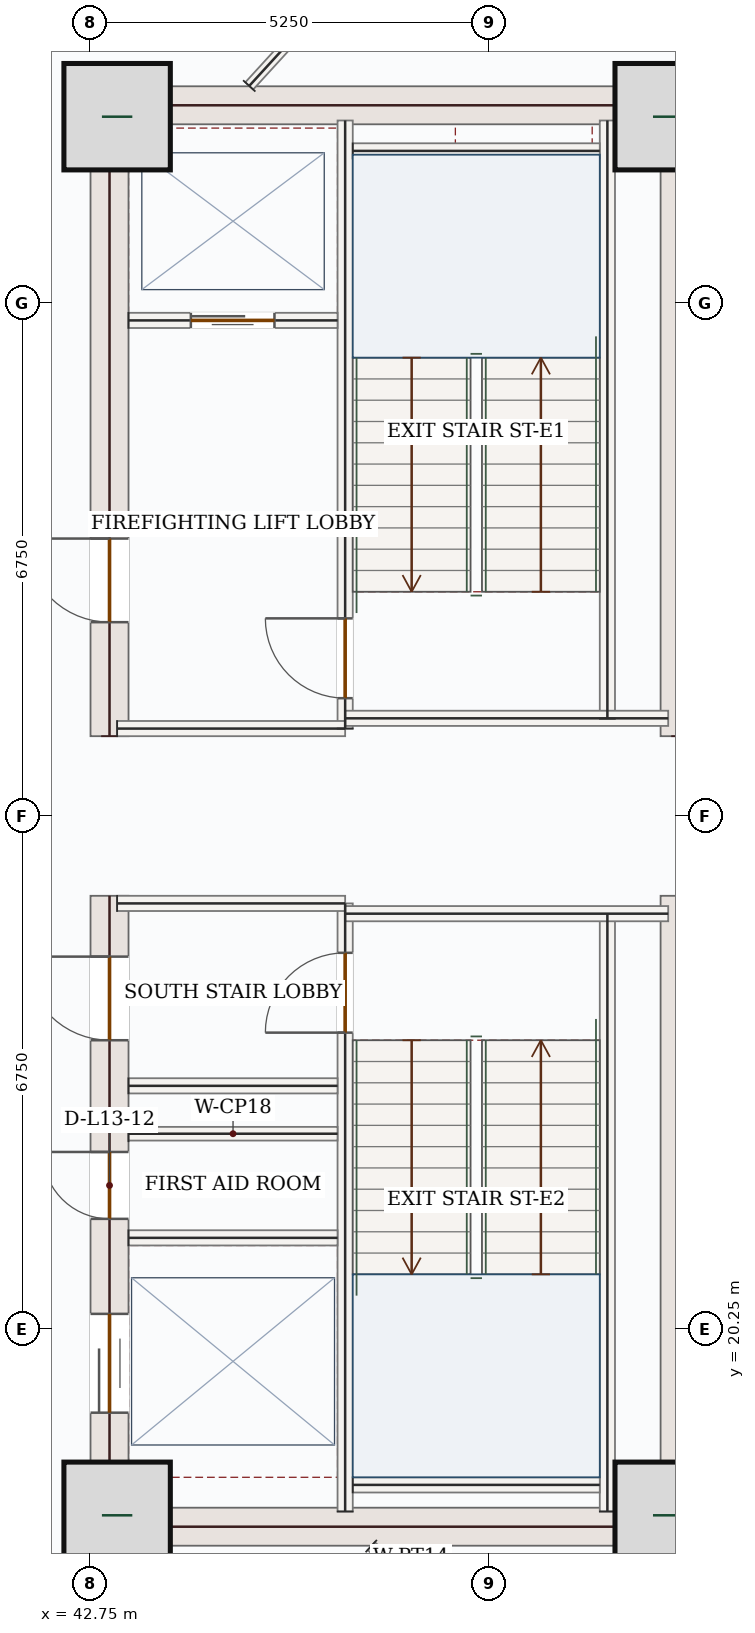
"""IFC4 building model, lengths in metres.
Left out: names, types, materials, properties, quantities, classifications, styles, units other than length and angle.
Written with IfcOpenShell. Run it as: python <this file> out.ifc"""

import sys

from ifc_helpers import new_model, si_unit, direction, frame, frame_2d, origin, origin_2d, place, context, subcontext, project, spatial, rectangle, extrude, source, transform, mapped, element, fill, save


model = new_model("IFC4")
c1 = context("Model", 3, precision=1e-05, world=origin(), true_north=direction((0.0, 1.0)))
c2 = subcontext(c1, "Body", "Model", "MODEL_VIEW")
j1 = project(units=[si_unit("LENGTHUNIT", "METRE"), si_unit("PLANEANGLEUNIT", "RADIAN")], contexts=[c1])
p1 = place(None, origin())
s1 = spatial("IfcSite", under=j1, at=p1, CompositionType="ELEMENT")
p2 = place(p1, origin())
s2 = spatial("IfcBuilding", under=s1, at=p2, CompositionType="ELEMENT")
p3 = place(p2, frame((0.0, 0.0, 62.7)))
s3 = spatial("IfcBuildingStorey", under=s2, at=p3, CompositionType="ELEMENT", Elevation=62.7)
p4 = place(p3, frame((43.0, 17.4, 0.0), z_axis=(0.0, 0.0, 1.0), x_axis=(0.0, 1.0, 0.0)))
e1 = element("IfcWall", 1, at=p4, inside=s3, PredefinedType="SHEAR", context=c2, shape_type="SweptSolid", body=[
    extrude(rectangle(XDim=8.55, YDim=0.5, at=frame_2d((4.275, 0.0))), origin(), (0.0, 0.0, 1.0), 3.95),
])
p5 = place(p4, frame((6.65, 0.0, 0.0)))
e2 = element("IfcOpeningElement", 2, at=p5, cuts=e1, PredefinedType="OPENING", context=c2, shape_type="SweptSolid", body=[
    extrude(rectangle(XDim=1.1, YDim=2.2, at=frame_2d((0.55, 1.1))), frame((0.0, 0.26, 0.0), z_axis=(0.0, -1.0, 0.0), x_axis=(1.0, 0.0, 0.0)), (0.0, 0.0, 1.0), 0.52),
])
p6 = place(p4, frame((1.75, 0.0, 0.0)))
e3 = element("IfcOpeningElement", 3, at=p6, cuts=e1, PredefinedType="OPENING", context=c2, shape_type="SweptSolid", body=[
    extrude(rectangle(XDim=1.3, YDim=2.2, at=frame_2d((0.65, 1.1))), frame((0.0, 0.26, 0.0), z_axis=(0.0, -1.0, 0.0), x_axis=(1.0, 0.0, 0.0)), (0.0, 0.0, 1.0), 0.52),
])
p7 = place(p4, frame((4.3, 0.0, 0.0)))
e4 = element("IfcOpeningElement", 4, at=p7, cuts=e1, PredefinedType="OPENING", context=c2, shape_type="SweptSolid", body=[
    extrude(rectangle(XDim=0.88, YDim=2.1, at=frame_2d((0.44, 1.05))), frame((0.0, 0.26, 0.0), z_axis=(0.0, -1.0, 0.0), x_axis=(1.0, 0.0, 0.0)), (0.0, 0.0, 1.0), 0.52),
])
p8 = place(p3, frame((43.0, 28.05, 0.0), z_axis=(0.0, 0.0, 1.0), x_axis=(0.0, 1.0, 0.0)))
e5 = element("IfcWall", 5, at=p8, inside=s3, PredefinedType="SHEAR", context=c2, shape_type="SweptSolid", body=[
    extrude(rectangle(XDim=8.55, YDim=0.5, at=frame_2d((4.275, 0.0))), origin(), (0.0, 0.0, 1.0), 3.95),
])
p9 = place(p8, frame((1.5, 0.0, 0.0)))
e6 = element("IfcOpeningElement", 6, at=p9, cuts=e5, PredefinedType="OPENING", context=c2, shape_type="SweptSolid", body=[
    extrude(rectangle(XDim=1.1, YDim=2.2, at=frame_2d((0.55, 1.1))), frame((0.0, 0.26, 0.0), z_axis=(0.0, -1.0, 0.0), x_axis=(1.0, 0.0, 0.0)), (0.0, 0.0, 1.0), 0.52),
])
m1 = source(origin(), c2, "Body", "SweptSolid", [
    extrude(rectangle(XDim=8.55, YDim=0.5, at=frame_2d((4.275, 0.0))), origin(), (0.0, 0.0, 1.0), 3.95),
])
for number, where, z_axis, x_axis in (
    (7, (50.5, 17.4, 0.0), (0.0, 0.0, 1.0), (0.0, 1.0, 0.0)),
    (8, (50.5, 28.05, 0.0), (0.0, 0.0, 1.0), (0.0, 1.0, 0.0)),
):
    element("IfcWall", number, at=place(p3, frame(where, z_axis=z_axis, x_axis=x_axis)), inside=s3, PredefinedType="SHEAR", context=c2, shape_type="MappedRepresentation", body=[
        mapped(m1, transform((0.0, 0.0, 0.0), x_axis=(1.0, 0.0, 0.0), y_axis=(0.0, 1.0, 0.0), z_axis=(0.0, 0.0, 1.0), scale=1.0)),
    ])
m2 = source(origin(), c2, "Body", "SweptSolid", [
    extrude(rectangle(XDim=7.0, YDim=0.5, at=frame_2d((3.5, 0.0))), origin(), (0.0, 0.0, 1.0), 3.95),
])
for number, where, z_axis, x_axis in (
    (9, (43.25, 17.65, 0.0), (0.0, 0.0, 1.0), (1.0, 0.0, 0.0)),
    (10, (43.25, 36.35, 0.0), (0.0, 0.0, 1.0), (1.0, 0.0, 0.0)),
):
    element("IfcWall", number, at=place(p3, frame(where, z_axis=z_axis, x_axis=x_axis)), inside=s3, PredefinedType="SHEAR", context=c2, shape_type="MappedRepresentation", body=[
        mapped(m2, transform((0.0, 0.0, 0.0), x_axis=(1.0, 0.0, 0.0), y_axis=(0.0, 1.0, 0.0), z_axis=(0.0, 0.0, 1.0), scale=1.0)),
    ])
m3 = source(origin(), c2, "Body", "SweptSolid", [
    extrude(rectangle(XDim=1.4, YDim=1.4, at=origin_2d()), origin(), (0.0, 0.0, 1.0), 4.2),
])
for number, where, z_axis, x_axis in (
    (11, (43.1, 17.8, 0.0), (0.0, 0.0, 1.0), (1.0, 0.0, 0.0)),
    (12, (50.35, 17.8, 0.0), (0.0, 0.0, 1.0), (1.0, 0.0, 0.0)),
    (13, (43.1, 36.2, 0.0), (0.0, 0.0, 1.0), (1.0, 0.0, 0.0)),
    (14, (50.35, 36.2, 0.0), (0.0, 0.0, 1.0), (1.0, 0.0, 0.0)),
):
    element("IfcColumn", number, at=place(p3, frame(where, z_axis=z_axis, x_axis=x_axis)), inside=s3, PredefinedType="COLUMN", context=c2, shape_type="MappedRepresentation", body=[
        mapped(m3, transform((0.0, 0.0, 0.0), x_axis=(1.0, 0.0, 0.0), y_axis=(0.0, 1.0, 0.0), z_axis=(0.0, 0.0, 1.0), scale=1.0)),
    ])
p10 = place(p3, frame((53.06, 18.458, 0.0), z_axis=(0.0, 0.0, 1.0), x_axis=(-0.707106781187, -0.707106781187, 0.0)))
e15 = element("IfcWall", 15, at=p10, inside=s3, PredefinedType="SOLIDWALL", context=c2, shape_type="SweptSolid", body=[
    extrude(rectangle(XDim=5.258, YDim=0.32, at=frame_2d((2.629, 0.0))), origin(), (0.0, 0.0, 1.0), 3.95),
])
p11 = place(p10, frame((1.429, 0.0, 0.85)))
e16 = element("IfcOpeningElement", 16, at=p11, cuts=e15, PredefinedType="OPENING", context=c2, shape_type="SweptSolid", body=[
    extrude(rectangle(XDim=2.4, YDim=1.8, at=frame_2d((1.2, 0.9))), frame((0.0, 0.17, 0.0), z_axis=(0.0, -1.0, 0.0), x_axis=(1.0, 0.0, 0.0)), (0.0, 0.0, 1.0), 0.34),
])
m4 = source(origin(), c2, "Body", "SweptSolid", [
    extrude(rectangle(XDim=5.258, YDim=0.32, at=frame_2d((2.629, 0.0))), origin(), (0.0, 0.0, 1.0), 3.95),
])
p12 = place(p3, frame((49.342, 39.26, 0.0), z_axis=(0.0, 0.0, 1.0), x_axis=(0.707106781187, -0.707106781187, 0.0)))
e17 = element("IfcWall", 17, at=p12, inside=s3, PredefinedType="SOLIDWALL", context=c2, shape_type="MappedRepresentation", body=[
    mapped(m4, transform((0.0, 0.0, 0.0), x_axis=(1.0, 0.0, 0.0), y_axis=(0.0, 1.0, 0.0), z_axis=(0.0, 0.0, 1.0), scale=1.0)),
])
m5 = source(origin(), c2, "Body", "SweptSolid", [
    extrude(rectangle(XDim=7.87, YDim=0.2, at=frame_2d((3.935, 0.0))), origin(), (0.0, 0.0, 1.0), 3.95),
])
for number, where, z_axis, x_axis in (
    (18, (49.55, 17.85, 0.0), (0.0, 0.0, 1.0), (0.0, 1.0, 0.0)),
    (19, (49.55, 28.28, 0.0), (0.0, 0.0, 1.0), (0.0, 1.0, 0.0)),
):
    element("IfcWall", number, at=place(p3, frame(where, z_axis=z_axis, x_axis=x_axis)), inside=s3, PredefinedType="SOLIDWALL", context=c2, shape_type="MappedRepresentation", body=[
        mapped(m5, transform((0.0, 0.0, 0.0), x_axis=(1.0, 0.0, 0.0), y_axis=(0.0, 1.0, 0.0), z_axis=(0.0, 0.0, 1.0), scale=1.0)),
    ])
p13 = place(p3, frame((46.1, 17.85, 0.0), z_axis=(0.0, 0.0, 1.0), x_axis=(0.0, 1.0, 0.0)))
e20 = element("IfcWall", 20, at=p13, inside=s3, PredefinedType="SOLIDWALL", context=c2, shape_type="SweptSolid", body=[
    extrude(rectangle(XDim=8.0, YDim=0.2, at=frame_2d((4.0, 0.0))), origin(), (0.0, 0.0, 1.0), 3.95),
])
p14 = place(p13, frame((6.3, 0.0, 0.0)))
e21 = element("IfcOpeningElement", 21, at=p14, cuts=e20, PredefinedType="OPENING", context=c2, shape_type="SweptSolid", body=[
    extrude(rectangle(XDim=1.05, YDim=2.15, at=frame_2d((0.525, 1.075))), frame((0.0, 0.11, 0.0), z_axis=(0.0, -1.0, 0.0), x_axis=(1.0, 0.0, 0.0)), (0.0, 0.0, 1.0), 0.22),
])
p15 = place(p3, frame((46.1, 28.15, 0.0), z_axis=(0.0, 0.0, 1.0), x_axis=(0.0, 1.0, 0.0)))
e22 = element("IfcWall", 22, at=p15, inside=s3, PredefinedType="SOLIDWALL", context=c2, shape_type="SweptSolid", body=[
    extrude(rectangle(XDim=8.0, YDim=0.2, at=frame_2d((4.0, 0.0))), origin(), (0.0, 0.0, 1.0), 3.95),
])
p16 = place(p15, frame((0.4, 0.0, 0.0)))
e23 = element("IfcOpeningElement", 23, at=p16, cuts=e22, PredefinedType="OPENING", context=c2, shape_type="SweptSolid", body=[
    extrude(rectangle(XDim=1.05, YDim=2.15, at=frame_2d((0.525, 1.075))), frame((0.0, 0.11, 0.0), z_axis=(0.0, -1.0, 0.0), x_axis=(1.0, 0.0, 0.0)), (0.0, 0.0, 1.0), 0.22),
])
m6 = source(origin(), c2, "Body", "SweptSolid", [
    extrude(rectangle(XDim=3.0, YDim=0.2, at=frame_2d((1.5, 0.0))), origin(), (0.0, 0.0, 1.0), 3.95),
])
p17 = place(p3, frame((43.1, 25.85, 0.0), z_axis=(0.0, 0.0, 1.0), x_axis=(1.0, 0.0, 0.0)))
e24 = element("IfcWall", 24, at=p17, inside=s3, PredefinedType="SOLIDWALL", context=c2, shape_type="MappedRepresentation", body=[
    mapped(m6, transform((0.0, 0.0, 0.0), x_axis=(1.0, 0.0, 0.0), y_axis=(0.0, 1.0, 0.0), z_axis=(0.0, 0.0, 1.0), scale=1.0)),
])
m7 = source(origin(), c2, "Body", "SweptSolid", [
    extrude(rectangle(XDim=4.25, YDim=0.2, at=frame_2d((2.125, 0.0))), origin(), (0.0, 0.0, 1.0), 3.95),
])
p18 = place(p3, frame((46.1, 25.715, 0.0), z_axis=(0.0, 0.0, 1.0), x_axis=(1.0, 0.0, 0.0)))
e25 = element("IfcWall", 25, at=p18, inside=s3, PredefinedType="SOLIDWALL", context=c2, shape_type="MappedRepresentation", body=[
    mapped(m7, transform((0.0, 0.0, 0.0), x_axis=(1.0, 0.0, 0.0), y_axis=(0.0, 1.0, 0.0), z_axis=(0.0, 0.0, 1.0), scale=1.0)),
])
p19 = place(p3, frame((43.1, 28.15, 0.0), z_axis=(0.0, 0.0, 1.0), x_axis=(1.0, 0.0, 0.0)))
e26 = element("IfcWall", 26, at=p19, inside=s3, PredefinedType="SOLIDWALL", context=c2, shape_type="MappedRepresentation", body=[
    mapped(m6, transform((0.0, 0.0, 0.0), x_axis=(1.0, 0.0, 0.0), y_axis=(0.0, 1.0, 0.0), z_axis=(0.0, 0.0, 1.0), scale=1.0)),
])
p20 = place(p3, frame((46.1, 28.285, 0.0), z_axis=(0.0, 0.0, 1.0), x_axis=(1.0, 0.0, 0.0)))
e27 = element("IfcWall", 27, at=p20, inside=s3, PredefinedType="SOLIDWALL", context=c2, shape_type="MappedRepresentation", body=[
    mapped(m7, transform((0.0, 0.0, 0.0), x_axis=(1.0, 0.0, 0.0), y_axis=(0.0, 1.0, 0.0), z_axis=(0.0, 0.0, 1.0), scale=1.0)),
])
m8 = source(origin(), c2, "Body", "SweptSolid", [
    extrude(rectangle(XDim=3.25, YDim=0.2, at=frame_2d((1.625, 0.0))), origin(), (0.0, 0.0, 1.0), 3.95),
])
for number, where, z_axis, x_axis in (
    (28, (46.2, 35.75, 0.0), (0.0, 0.0, 1.0), (1.0, 0.0, 0.0)),
    (29, (46.2, 18.2, 0.0), (0.0, 0.0, 1.0), (1.0, 0.0, 0.0)),
):
    element("IfcWall", number, at=place(p3, frame(where, z_axis=z_axis, x_axis=x_axis)), inside=s3, PredefinedType="SOLIDWALL", context=c2, shape_type="MappedRepresentation", body=[
        mapped(m8, transform((0.0, 0.0, 0.0), x_axis=(1.0, 0.0, 0.0), y_axis=(0.0, 1.0, 0.0), z_axis=(0.0, 0.0, 1.0), scale=1.0)),
    ])
p21 = place(p3, frame((43.25, 33.52, 0.0), z_axis=(0.0, 0.0, 1.0), x_axis=(1.0, 0.0, 0.0)))
e30 = element("IfcWall", 30, at=p21, inside=s3, PredefinedType="SOLIDWALL", context=c2, shape_type="SweptSolid", body=[
    extrude(rectangle(XDim=2.75, YDim=0.2, at=frame_2d((1.375, 0.0))), origin(), (0.0, 0.0, 1.0), 3.95),
])
p22 = place(p21, frame((0.82, 0.0, 0.0)))
e31 = element("IfcOpeningElement", 31, at=p22, cuts=e30, PredefinedType="OPENING", context=c2, shape_type="SweptSolid", body=[
    extrude(rectangle(XDim=1.1, YDim=2.15, at=frame_2d((0.55, 1.075))), frame((0.0, 0.11, 0.0), z_axis=(0.0, -1.0, 0.0), x_axis=(1.0, 0.0, 0.0)), (0.0, 0.0, 1.0), 0.22),
])
m9 = source(origin(), c2, "Body", "SweptSolid", [
    extrude(rectangle(XDim=2.75, YDim=0.2, at=frame_2d((1.375, 0.0))), origin(), (0.0, 0.0, 1.0), 3.95),
])
for number, where, z_axis, x_axis in (
    (32, (43.25, 23.45, 0.0), (0.0, 0.0, 1.0), (1.0, 0.0, 0.0)),
    (33, (43.25, 21.45, 0.0), (0.0, 0.0, 1.0), (1.0, 0.0, 0.0)),
):
    element("IfcWall", number, at=place(p3, frame(where, z_axis=z_axis, x_axis=x_axis)), inside=s3, PredefinedType="SOLIDWALL", context=c2, shape_type="MappedRepresentation", body=[
        mapped(m9, transform((0.0, 0.0, 0.0), x_axis=(1.0, 0.0, 0.0), y_axis=(0.0, 1.0, 0.0), z_axis=(0.0, 0.0, 1.0), scale=1.0)),
    ])
m10 = source(origin(), c2, "Body", "SweptSolid", [
    extrude(rectangle(XDim=2.75, YDim=0.18, at=frame_2d((1.375, 0.0))), origin(), (0.0, 0.0, 1.0), 3.95),
])
p23 = place(p3, frame((43.25, 22.82, 0.0), z_axis=(0.0, 0.0, 1.0), x_axis=(1.0, 0.0, 0.0)))
e34 = element("IfcWall", 34, at=p23, inside=s3, PredefinedType="PARTITIONING", context=c2, shape_type="MappedRepresentation", body=[
    mapped(m10, transform((0.0, 0.0, 0.0), x_axis=(1.0, 0.0, 0.0), y_axis=(0.0, 1.0, 0.0), z_axis=(0.0, 0.0, 1.0), scale=1.0)),
])
m11 = source(origin(), c2, "Body", "SweptSolid", [
    extrude(rectangle(XDim=1.417, YDim=0.14, at=frame_2d((0.708, 0.0))), origin(), (0.0, 0.0, 1.0), 3.95),
])
p24 = place(p3, frame((46.443, 17.395, 0.0), z_axis=(0.0, 0.0, 1.0), x_axis=(0.737776192982, -0.675045397784, 0.0)))
e35 = element("IfcWall", 35, at=p24, inside=s3, PredefinedType="PARTITIONING", context=c2, shape_type="MappedRepresentation", body=[
    mapped(m11, transform((0.0, 0.0, 0.0), x_axis=(1.0, 0.0, 0.0), y_axis=(0.0, 1.0, 0.0), z_axis=(0.0, 0.0, 1.0), scale=1.0)),
])
m12 = source(origin(), c2, "Body", "SweptSolid", [
    extrude(rectangle(XDim=3.375, YDim=0.14, at=frame_2d((1.688, 0.0))), origin(), (0.0, 0.0, 1.0), 3.95),
])
p25 = place(p3, frame((44.838, 36.605, 0.0), z_axis=(0.0, 0.0, 1.0), x_axis=(0.674974079893, 0.737841440604, 0.0)))
e36 = element("IfcWall", 36, at=p25, inside=s3, PredefinedType="PARTITIONING", context=c2, shape_type="MappedRepresentation", body=[
    mapped(m12, transform((0.0, 0.0, 0.0), x_axis=(1.0, 0.0, 0.0), y_axis=(0.0, 1.0, 0.0), z_axis=(0.0, 0.0, 1.0), scale=1.0)),
])
m13 = source(origin(), c2, "Body", "SweptSolid", [
    extrude(rectangle(XDim=2.4, YDim=1.8, at=frame_2d((1.2, 0.9))), frame((0.0, 0.03, 0.0), z_axis=(0.0, -1.0, 0.0), x_axis=(1.0, 0.0, 0.0)), (0.0, 0.0, 1.0), 0.06),
])
p26 = place(p11, origin())
e37 = element("IfcWindow", 37, at=p26, inside=s3, PartitioningType="DOUBLE_PANEL_VERTICAL", PredefinedType="WINDOW", context=c2, shape_type="MappedRepresentation", body=[
    mapped(m13, transform((0.0, 0.0, 0.0), x_axis=(1.0, 0.0, 0.0), y_axis=(0.0, 1.0, 0.0), z_axis=(0.0, 0.0, 1.0), scale=1.0)),
])
fill(e16, e37)
m14 = source(origin(), c2, "Body", "SweptSolid", [
    extrude(rectangle(XDim=1.05, YDim=2.15, at=frame_2d((0.525, 1.075))), frame((0.0, 0.025, 0.0), z_axis=(0.0, -1.0, 0.0), x_axis=(1.0, 0.0, 0.0)), (0.0, 0.0, 1.0), 0.05),
])
p27 = place(p16, origin())
e38 = element("IfcDoor", 38, at=p27, inside=s3, OperationType="SINGLE_SWING_RIGHT", PredefinedType="DOOR", context=c2, shape_type="MappedRepresentation", body=[
    mapped(m14, transform((0.0, 0.0, 0.0), x_axis=(1.0, 0.0, 0.0), y_axis=(0.0, 1.0, 0.0), z_axis=(0.0, 0.0, 1.0), scale=1.0)),
])
fill(e23, e38)
p28 = place(p14, origin())
e39 = element("IfcDoor", 39, at=p28, inside=s3, OperationType="SINGLE_SWING_LEFT", PredefinedType="DOOR", context=c2, shape_type="MappedRepresentation", body=[
    mapped(m14, transform((0.0, 0.0, 0.0), x_axis=(1.0, 0.0, 0.0), y_axis=(0.0, 1.0, 0.0), z_axis=(0.0, 0.0, 1.0), scale=1.0)),
])
fill(e21, e39)
m15 = source(origin(), c2, "Body", "SweptSolid", [
    extrude(rectangle(XDim=1.1, YDim=2.15, at=frame_2d((0.55, 1.075))), frame((0.0, 0.025, 0.0), z_axis=(0.0, -1.0, 0.0), x_axis=(1.0, 0.0, 0.0)), (0.0, 0.0, 1.0), 0.05),
])
p29 = place(p22, origin())
e40 = element("IfcDoor", 40, at=p29, inside=s3, OperationType="DOUBLE_DOOR_SLIDING", PredefinedType="DOOR", context=c2, shape_type="MappedRepresentation", body=[
    mapped(m15, transform((0.0, 0.0, 0.0), x_axis=(1.0, 0.0, 0.0), y_axis=(0.0, 1.0, 0.0), z_axis=(0.0, 0.0, 1.0), scale=1.0)),
])
fill(e31, e40)
m16 = source(origin(), c2, "Body", "SweptSolid", [
    extrude(rectangle(XDim=1.1, YDim=2.2, at=frame_2d((0.55, 1.1))), frame((0.0, 0.025, 0.0), z_axis=(0.0, -1.0, 0.0), x_axis=(1.0, 0.0, 0.0)), (0.0, 0.0, 1.0), 0.05),
])
p30 = place(p9, origin())
e41 = element("IfcDoor", 41, at=p30, inside=s3, OperationType="SINGLE_SWING_RIGHT", PredefinedType="DOOR", context=c2, shape_type="MappedRepresentation", body=[
    mapped(m16, transform((0.0, 0.0, 0.0), x_axis=(1.0, 0.0, 0.0), y_axis=(0.0, 1.0, 0.0), z_axis=(0.0, 0.0, 1.0), scale=1.0)),
])
fill(e6, e41)
p31 = place(p5, origin())
e42 = element("IfcDoor", 42, at=p31, inside=s3, OperationType="SINGLE_SWING_RIGHT", PredefinedType="DOOR", context=c2, shape_type="MappedRepresentation", body=[
    mapped(m16, transform((0.0, 0.0, 0.0), x_axis=(1.0, 0.0, 0.0), y_axis=(0.0, 1.0, 0.0), z_axis=(0.0, 0.0, 1.0), scale=1.0)),
])
fill(e2, e42)
m17 = source(origin(), c2, "Body", "SweptSolid", [
    extrude(rectangle(XDim=1.3, YDim=2.2, at=frame_2d((0.65, 1.1))), frame((0.0, 0.025, 0.0), z_axis=(0.0, -1.0, 0.0), x_axis=(1.0, 0.0, 0.0)), (0.0, 0.0, 1.0), 0.05),
])
p32 = place(p6, origin())
e43 = element("IfcDoor", 43, at=p32, inside=s3, OperationType="DOUBLE_DOOR_SLIDING", PredefinedType="DOOR", context=c2, shape_type="MappedRepresentation", body=[
    mapped(m17, transform((0.0, 0.0, 0.0), x_axis=(1.0, 0.0, 0.0), y_axis=(0.0, 1.0, 0.0), z_axis=(0.0, 0.0, 1.0), scale=1.0)),
])
fill(e3, e43)
m18 = source(origin(), c2, "Body", "SweptSolid", [
    extrude(rectangle(XDim=0.88, YDim=2.1, at=frame_2d((0.44, 1.05))), frame((0.0, 0.025, 0.0), z_axis=(0.0, -1.0, 0.0), x_axis=(1.0, 0.0, 0.0)), (0.0, 0.0, 1.0), 0.05),
])
p33 = place(p7, origin())
e44 = element("IfcDoor", 44, at=p33, inside=s3, OperationType="SINGLE_SWING_RIGHT", PredefinedType="DOOR", context=c2, shape_type="MappedRepresentation", body=[
    mapped(m18, transform((0.0, 0.0, 0.0), x_axis=(1.0, 0.0, 0.0), y_axis=(0.0, 1.0, 0.0), z_axis=(0.0, 0.0, 1.0), scale=1.0)),
])
fill(e4, e44)
save(model, sys.argv[1])
